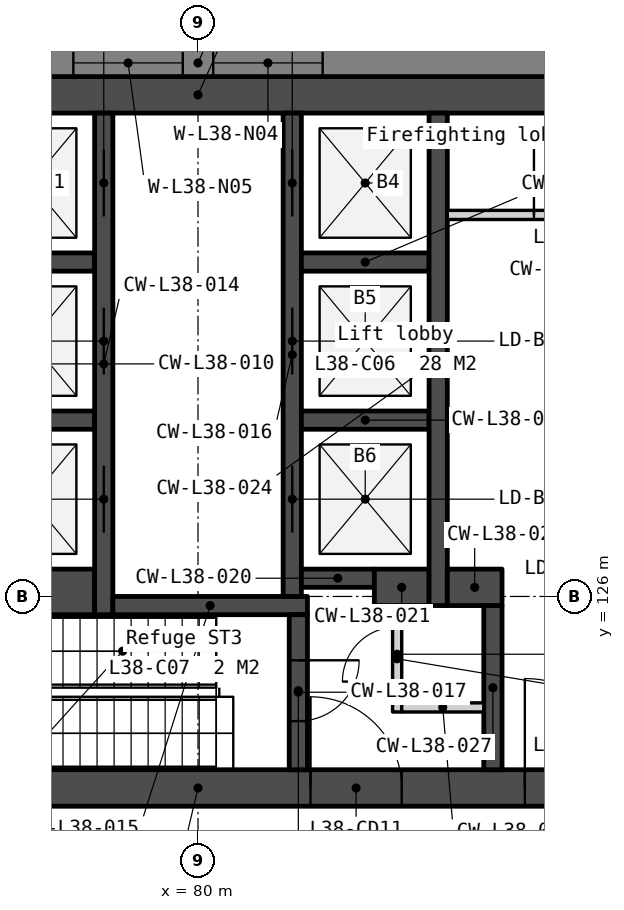
"""IFC4 building model, lengths in metres.
Left out: names, types, materials, properties, quantities, classifications, styles, units other than length and angle.
Written with IfcOpenShell. Run it as: python <this file> out.ifc"""

import sys

from ifc_helpers import new_model, si_unit, direction, frame, frame_2d, origin, place, context, subcontext, project, spatial, polyline, rectangle, outline, extrude, element, fill, save


model = new_model("IFC4")
c1 = context("Model", 3, precision=1e-05, world=origin(), true_north=direction((0.0, 1.0)))
c2 = subcontext(c1, "Body", "Model", "MODEL_VIEW")
j1 = project(units=[si_unit("LENGTHUNIT", "METRE"), si_unit("PLANEANGLEUNIT", "RADIAN")], contexts=[c1])
p1 = place(None, origin())
s1 = spatial("IfcSite", under=j1, at=p1, CompositionType="ELEMENT")
p2 = place(p1, origin())
s2 = spatial("IfcBuilding", under=s1, at=p2, CompositionType="ELEMENT")
p3 = place(p2, frame((0.0, 0.0, 152.0)))
s3 = spatial("IfcBuildingStorey", under=s2, at=p3, CompositionType="ELEMENT", Elevation=152.0)
p4 = place(p3, frame((69.0, 134.25, 0.0), z_axis=(0.0, 0.0, 1.0), x_axis=(1.0, 0.0, 0.0)))
e1 = element("IfcWall", 1, at=p4, inside=s3, PredefinedType="SOLIDWALL", context=c2, shape_type="SweptSolid", body=[
    extrude(rectangle(XDim=22.0, YDim=0.6, at=frame_2d((11.0, 0.0))), origin(), (0.0, 0.0, 1.0), 3.75),
])
p5 = place(p3, frame((69.0, 122.85, 0.0), z_axis=(0.0, 0.0, 1.0), x_axis=(1.0, 0.0, 0.0)))
e2 = element("IfcWall", 2, at=p5, inside=s3, PredefinedType="SOLIDWALL", context=c2, shape_type="SweptSolid", body=[
    extrude(rectangle(XDim=22.0, YDim=0.6, at=frame_2d((11.0, 0.0))), origin(), (0.0, 0.0, 1.0), 3.75),
])
p6 = place(p5, frame((16.375, 0.0, 0.0)))
e3 = element("IfcOpeningElement", 3, at=p6, cuts=e2, PredefinedType="OPENING", context=c2, shape_type="SweptSolid", body=[
    extrude(rectangle(XDim=1.8, YDim=2.1, at=frame_2d((0.9, 1.05))), frame((0.0, 0.31, 0.0), z_axis=(0.0, -1.0, 0.0), x_axis=(1.0, 0.0, 0.0)), (0.0, 0.0, 1.0), 0.62),
])
p7 = place(p5, frame((3.825, 0.0, 0.0)))
e4 = element("IfcOpeningElement", 4, at=p7, cuts=e2, PredefinedType="OPENING", context=c2, shape_type="SweptSolid", body=[
    extrude(rectangle(XDim=1.8, YDim=2.1, at=frame_2d((0.9, 1.05))), frame((0.0, 0.31, 0.0), z_axis=(0.0, -1.0, 0.0), x_axis=(1.0, 0.0, 0.0)), (0.0, 0.0, 1.0), 0.62),
])
p8 = place(p5, frame((12.85, 0.0, 0.0)))
e5 = element("IfcOpeningElement", 5, at=p8, cuts=e2, PredefinedType="OPENING", context=c2, shape_type="SweptSolid", body=[
    extrude(rectangle(XDim=1.5, YDim=2.1, at=frame_2d((0.75, 1.05))), frame((0.0, 0.31, 0.0), z_axis=(0.0, -1.0, 0.0), x_axis=(1.0, 0.0, 0.0)), (0.0, 0.0, 1.0), 0.62),
])
for number, where, z_axis, x_axis in (
    (6, (76.2, 131.5, 0.0), (0.0, 0.0, 1.0), (1.0, 0.0, 0.0)),
    (7, (76.2, 128.9, 0.0), (0.0, 0.0, 1.0), (1.0, 0.0, 0.0)),
):
    element("IfcWall", number, at=place(p3, frame(where, z_axis=z_axis, x_axis=x_axis)), inside=s3, PredefinedType="SOLIDWALL", context=c2, shape_type="SweptSolid", body=[
        extrude(rectangle(XDim=2.1, YDim=0.3, at=frame_2d((1.05, 0.0))), origin(), (0.0, 0.0, 1.0), 3.75),
    ])
p9 = place(p3, frame((76.2, 126.075, 0.0), z_axis=(0.0, 0.0, 1.0), x_axis=(1.0, 0.0, 0.0)))
e8 = element("IfcWall", 8, at=p9, inside=s3, PredefinedType="SOLIDWALL", context=c2, shape_type="SweptSolid", body=[
    extrude(rectangle(XDim=2.1, YDim=0.75, at=frame_2d((1.05, 0.0))), origin(), (0.0, 0.0, 1.0), 3.75),
])
p10 = place(p3, frame((78.45, 133.95, 0.0), z_axis=(0.0, 0.0, 1.0), x_axis=(0.0, -1.0, 0.0)))
e9 = element("IfcWall", 9, at=p10, inside=s3, PredefinedType="SOLIDWALL", context=c2, shape_type="SweptSolid", body=[
    extrude(rectangle(XDim=8.25, YDim=0.3, at=frame_2d((4.125, 0.0))), origin(), (0.0, 0.0, 1.0), 3.75),
])
p11 = place(p10, frame((0.6, 0.0, 0.0)))
e10 = element("IfcOpeningElement", 10, at=p11, cuts=e9, PredefinedType="OPENING", context=c2, shape_type="SweptSolid", body=[
    extrude(rectangle(XDim=1.1, YDim=2.1, at=frame_2d((0.55, 1.05))), frame((0.0, 0.16, 0.0), z_axis=(0.0, -1.0, 0.0), x_axis=(1.0, 0.0, 0.0)), (0.0, 0.0, 1.0), 0.32),
])
p12 = place(p10, frame((3.2, 0.0, 0.0)))
e11 = element("IfcOpeningElement", 11, at=p12, cuts=e9, PredefinedType="OPENING", context=c2, shape_type="SweptSolid", body=[
    extrude(rectangle(XDim=1.1, YDim=2.1, at=frame_2d((0.55, 1.05))), frame((0.0, 0.16, 0.0), z_axis=(0.0, -1.0, 0.0), x_axis=(1.0, 0.0, 0.0)), (0.0, 0.0, 1.0), 0.32),
])
p13 = place(p10, frame((5.8, 0.0, 0.0)))
e12 = element("IfcOpeningElement", 12, at=p13, cuts=e9, PredefinedType="OPENING", context=c2, shape_type="SweptSolid", body=[
    extrude(rectangle(XDim=1.1, YDim=2.1, at=frame_2d((0.55, 1.05))), frame((0.0, 0.16, 0.0), z_axis=(0.0, -1.0, 0.0), x_axis=(1.0, 0.0, 0.0)), (0.0, 0.0, 1.0), 0.32),
])
p14 = place(p3, frame((78.6, 125.85, 0.0), z_axis=(0.0, 0.0, 1.0), x_axis=(1.0, 0.0, 0.0)))
e13 = element("IfcWall", 13, at=p14, inside=s3, PredefinedType="SOLIDWALL", context=c2, shape_type="SweptSolid", body=[
    extrude(rectangle(XDim=3.2, YDim=0.3, at=frame_2d((1.6, 0.0))), origin(), (0.0, 0.0, 1.0), 3.75),
])
p15 = place(p3, frame((81.55, 133.95, 0.0), z_axis=(0.0, 0.0, 1.0), x_axis=(0.0, -1.0, 0.0)))
e14 = element("IfcWall", 14, at=p15, inside=s3, PredefinedType="SOLIDWALL", context=c2, shape_type="SweptSolid", body=[
    extrude(rectangle(XDim=7.95, YDim=0.3, at=frame_2d((3.975, 0.0))), origin(), (0.0, 0.0, 1.0), 3.75),
])
p16 = place(p15, frame((0.6, 0.0, 0.0)))
e15 = element("IfcOpeningElement", 15, at=p16, cuts=e14, PredefinedType="OPENING", context=c2, shape_type="SweptSolid", body=[
    extrude(rectangle(XDim=1.1, YDim=2.1, at=frame_2d((0.55, 1.05))), frame((0.0, 0.16, 0.0), z_axis=(0.0, -1.0, 0.0), x_axis=(1.0, 0.0, 0.0)), (0.0, 0.0, 1.0), 0.32),
])
p17 = place(p15, frame((3.2, 0.0, 0.0)))
e16 = element("IfcOpeningElement", 16, at=p17, cuts=e14, PredefinedType="OPENING", context=c2, shape_type="SweptSolid", body=[
    extrude(rectangle(XDim=1.1, YDim=2.1, at=frame_2d((0.55, 1.05))), frame((0.0, 0.16, 0.0), z_axis=(0.0, -1.0, 0.0), x_axis=(1.0, 0.0, 0.0)), (0.0, 0.0, 1.0), 0.32),
])
p18 = place(p15, frame((5.8, 0.0, 0.0)))
e17 = element("IfcOpeningElement", 17, at=p18, cuts=e14, PredefinedType="OPENING", context=c2, shape_type="SweptSolid", body=[
    extrude(rectangle(XDim=1.1, YDim=2.1, at=frame_2d((0.55, 1.05))), frame((0.0, 0.16, 0.0), z_axis=(0.0, -1.0, 0.0), x_axis=(1.0, 0.0, 0.0)), (0.0, 0.0, 1.0), 0.32),
])
p19 = place(p3, frame((81.65, 125.7, 0.0), z_axis=(0.0, 0.0, 1.0), x_axis=(0.0, -1.0, 0.0)))
e18 = element("IfcWall", 18, at=p19, inside=s3, PredefinedType="SOLIDWALL", context=c2, shape_type="SweptSolid", body=[
    extrude(rectangle(XDim=2.55, YDim=0.3, at=frame_2d((1.275, 0.0))), origin(), (0.0, 0.0, 1.0), 3.75),
])
p20 = place(p19, frame((0.75, 0.0, 0.0)))
e19 = element("IfcOpeningElement", 19, at=p20, cuts=e18, PredefinedType="OPENING", context=c2, shape_type="SweptSolid", body=[
    extrude(rectangle(XDim=1.0, YDim=2.1, at=frame_2d((0.5, 1.05))), frame((0.0, 0.16, 0.0), z_axis=(0.0, -1.0, 0.0), x_axis=(1.0, 0.0, 0.0)), (0.0, 0.0, 1.0), 0.32),
])
for number, where, z_axis, x_axis in (
    (20, (81.7, 131.5, 0.0), (0.0, 0.0, 1.0), (1.0, 0.0, 0.0)),
    (21, (81.7, 128.9, 0.0), (0.0, 0.0, 1.0), (1.0, 0.0, 0.0)),
):
    element("IfcWall", number, at=place(p3, frame(where, z_axis=z_axis, x_axis=x_axis)), inside=s3, PredefinedType="SOLIDWALL", context=c2, shape_type="SweptSolid", body=[
        extrude(rectangle(XDim=2.1, YDim=0.3, at=frame_2d((1.05, 0.0))), origin(), (0.0, 0.0, 1.0), 3.75),
    ])
p21 = place(p3, frame((81.7, 126.3, 0.0), z_axis=(0.0, 0.0, 1.0), x_axis=(1.0, 0.0, 0.0)))
e22 = element("IfcWall", 22, at=p21, inside=s3, PredefinedType="SOLIDWALL", context=c2, shape_type="SweptSolid", body=[
    extrude(rectangle(XDim=1.2, YDim=0.3, at=frame_2d((0.6, 0.0))), origin(), (0.0, 0.0, 1.0), 3.75),
])
p22 = place(p3, frame((82.9, 126.15, 0.0), z_axis=(0.0, 0.0, 1.0), x_axis=(1.0, 0.0, 0.0)))
e23 = element("IfcWall", 23, at=p22, inside=s3, PredefinedType="SOLIDWALL", context=c2, shape_type="SweptSolid", body=[
    extrude(rectangle(XDim=0.9, YDim=0.6, at=frame_2d((0.45, 0.0))), origin(), (0.0, 0.0, 1.0), 3.75),
])
p23 = place(p3, frame((83.275, 125.85, 0.0), z_axis=(0.0, 0.0, 1.0), x_axis=(0.0, -1.0, 0.0)))
e24 = element("IfcWall", 24, at=p23, inside=s3, PredefinedType="PARTITIONING", context=c2, shape_type="SweptSolid", body=[
    extrude(rectangle(XDim=1.75, YDim=0.15, at=frame_2d((0.875, 0.0))), origin(), (0.0, 0.0, 1.0), 3.75),
])
p24 = place(p23, frame((0.35, 0.0, 0.0)))
e25 = element("IfcOpeningElement", 25, at=p24, cuts=e24, PredefinedType="OPENING", context=c2, shape_type="SweptSolid", body=[
    extrude(rectangle(XDim=0.9, YDim=2.1, at=frame_2d((0.45, 1.05))), frame((0.0, 0.085, 0.0), z_axis=(0.0, -1.0, 0.0), x_axis=(1.0, 0.0, 0.0)), (0.0, 0.0, 1.0), 0.17),
])
p25 = place(p3, frame((83.35, 124.175, 0.0), z_axis=(0.0, 0.0, 1.0), x_axis=(1.0, 0.0, 0.0)))
e26 = element("IfcWall", 26, at=p25, inside=s3, PredefinedType="PARTITIONING", context=c2, shape_type="SweptSolid", body=[
    extrude(rectangle(XDim=1.35, YDim=0.15, at=frame_2d((0.675, 0.0))), origin(), (0.0, 0.0, 1.0), 3.75),
])
p26 = place(p3, frame((83.95, 133.95, 0.0), z_axis=(0.0, 0.0, 1.0), x_axis=(0.0, -1.0, 0.0)))
e27 = element("IfcWall", 27, at=p26, inside=s3, PredefinedType="SOLIDWALL", context=c2, shape_type="SweptSolid", body=[
    extrude(rectangle(XDim=8.1, YDim=0.3, at=frame_2d((4.05, 0.0))), origin(), (0.0, 0.0, 1.0), 3.75),
])
p27 = place(p3, frame((84.1, 132.275, 0.0), z_axis=(0.0, 0.0, 1.0), x_axis=(1.0, 0.0, 0.0)))
e28 = element("IfcWall", 28, at=p27, inside=s3, PredefinedType="PARTITIONING", context=c2, shape_type="SweptSolid", body=[
    extrude(rectangle(XDim=3.45, YDim=0.15, at=frame_2d((1.725, 0.0))), origin(), (0.0, 0.0, 1.0), 3.75),
])
p28 = place(p27, frame((1.425, 0.0, 0.0)))
e29 = element("IfcOpeningElement", 29, at=p28, cuts=e28, PredefinedType="OPENING", context=c2, shape_type="SweptSolid", body=[
    extrude(rectangle(XDim=1.5, YDim=2.1, at=frame_2d((0.75, 1.05))), frame((0.0, 0.085, 0.0), z_axis=(0.0, -1.0, 0.0), x_axis=(1.0, 0.0, 0.0)), (0.0, 0.0, 1.0), 0.17),
])
p29 = place(p3, frame((84.1, 126.15, 0.0), z_axis=(0.0, 0.0, 1.0), x_axis=(1.0, 0.0, 0.0)))
e30 = element("IfcWall", 30, at=p29, inside=s3, PredefinedType="SOLIDWALL", context=c2, shape_type="SweptSolid", body=[
    extrude(rectangle(XDim=0.9, YDim=0.6, at=frame_2d((0.45, 0.0))), origin(), (0.0, 0.0, 1.0), 3.75),
])
p30 = place(p3, frame((84.85, 125.85, 0.0), z_axis=(0.0, 0.0, 1.0), x_axis=(0.0, -1.0, 0.0)))
e31 = element("IfcWall", 31, at=p30, inside=s3, PredefinedType="SOLIDWALL", context=c2, shape_type="SweptSolid", body=[
    extrude(rectangle(XDim=2.7, YDim=0.3, at=frame_2d((1.35, 0.0))), origin(), (0.0, 0.0, 1.0), 3.75),
])
p31 = place(p3, frame((100.243, 134.775, -0.15), z_axis=(0.0, 0.0, 1.0), x_axis=(-1.0, 0.0, 0.0)))
e32 = element("IfcWall", 32, at=p31, inside=s3, PredefinedType="SOLIDWALL", context=c2, shape_type="SweptSolid", body=[
    extrude(outline(polyline([(40.486, 0.0), (40.486, 3.9), (0.0, 3.9), (0.0, 0.0), (40.486, 0.0)])), frame((0.0, 0.225, 0.0), z_axis=(0.0, -1.0, 0.0), x_axis=(1.0, 0.0, 0.0)), (0.0, 0.0, 1.0), 0.45),
])
p32 = place(p31, frame((0.87, 0.0, 0.95)))
e33 = element("IfcOpeningElement", 33, at=p32, cuts=e32, PredefinedType="OPENING", context=c2, shape_type="SweptSolid", body=[
    extrude(rectangle(XDim=1.2, YDim=2.2, at=frame_2d((0.6, 1.1))), frame((0.0, 0.235, 0.0), z_axis=(0.0, -1.0, 0.0), x_axis=(1.0, 0.0, 0.0)), (0.0, 0.0, 1.0), 0.47),
])
p33 = place(p31, frame((8.072, 0.0, 0.95)))
e34 = element("IfcOpeningElement", 34, at=p33, cuts=e32, PredefinedType="OPENING", context=c2, shape_type="SweptSolid", body=[
    extrude(rectangle(XDim=1.8, YDim=2.2, at=frame_2d((0.9, 1.1))), frame((0.0, 0.235, 0.0), z_axis=(0.0, -1.0, 0.0), x_axis=(1.0, 0.0, 0.0)), (0.0, 0.0, 1.0), 0.47),
])
p34 = place(p31, frame((10.372, 0.0, 0.95)))
e35 = element("IfcOpeningElement", 35, at=p34, cuts=e32, PredefinedType="OPENING", context=c2, shape_type="SweptSolid", body=[
    extrude(rectangle(XDim=1.8, YDim=2.2, at=frame_2d((0.9, 1.1))), frame((0.0, 0.235, 0.0), z_axis=(0.0, -1.0, 0.0), x_axis=(1.0, 0.0, 0.0)), (0.0, 0.0, 1.0), 0.47),
])
p35 = place(p31, frame((18.193, 0.0, 0.95)))
e36 = element("IfcOpeningElement", 36, at=p35, cuts=e32, PredefinedType="OPENING", context=c2, shape_type="SweptSolid", body=[
    extrude(rectangle(XDim=1.8, YDim=2.2, at=frame_2d((0.9, 1.1))), frame((0.0, 0.235, 0.0), z_axis=(0.0, -1.0, 0.0), x_axis=(1.0, 0.0, 0.0)), (0.0, 0.0, 1.0), 0.47),
])
p36 = place(p31, frame((20.493, 0.0, 0.95)))
e37 = element("IfcOpeningElement", 37, at=p36, cuts=e32, PredefinedType="OPENING", context=c2, shape_type="SweptSolid", body=[
    extrude(rectangle(XDim=1.8, YDim=2.2, at=frame_2d((0.9, 1.1))), frame((0.0, 0.235, 0.0), z_axis=(0.0, -1.0, 0.0), x_axis=(1.0, 0.0, 0.0)), (0.0, 0.0, 1.0), 0.47),
])
p37 = place(p31, frame((28.315, 0.0, 0.95)))
e38 = element("IfcOpeningElement", 38, at=p37, cuts=e32, PredefinedType="OPENING", context=c2, shape_type="SweptSolid", body=[
    extrude(rectangle(XDim=1.8, YDim=2.2, at=frame_2d((0.9, 1.1))), frame((0.0, 0.235, 0.0), z_axis=(0.0, -1.0, 0.0), x_axis=(1.0, 0.0, 0.0)), (0.0, 0.0, 1.0), 0.47),
])
p38 = place(p31, frame((30.615, 0.0, 0.95)))
e39 = element("IfcOpeningElement", 39, at=p38, cuts=e32, PredefinedType="OPENING", context=c2, shape_type="SweptSolid", body=[
    extrude(rectangle(XDim=1.8, YDim=2.2, at=frame_2d((0.9, 1.1))), frame((0.0, 0.235, 0.0), z_axis=(0.0, -1.0, 0.0), x_axis=(1.0, 0.0, 0.0)), (0.0, 0.0, 1.0), 0.47),
])
p39 = place(p31, frame((38.417, 0.0, 0.95)))
e40 = element("IfcOpeningElement", 40, at=p39, cuts=e32, PredefinedType="OPENING", context=c2, shape_type="SweptSolid", body=[
    extrude(rectangle(XDim=1.2, YDim=2.2, at=frame_2d((0.6, 1.1))), frame((0.0, 0.235, 0.0), z_axis=(0.0, -1.0, 0.0), x_axis=(1.0, 0.0, 0.0)), (0.0, 0.0, 1.0), 0.47),
])
p40 = place(p3, frame((82.105, 96.067, -0.15), z_axis=(0.0, 0.0, 1.0), x_axis=(0.499997369791, 0.866026922331, 0.0)))
e41 = element("IfcWall", 41, at=p40, inside=s3, PredefinedType="SOLIDWALL", context=c2, shape_type="SweptSolid", body=[
    extrude(outline(polyline([(40.486, 0.0), (40.486, 3.9), (0.0, 3.9), (0.0, 0.0), (40.486, 0.0)])), frame((0.0, 0.225, 0.0), z_axis=(0.0, -1.0, 0.0), x_axis=(1.0, 0.0, 0.0)), (0.0, 0.0, 1.0), 0.45),
])
p41 = place(p40, frame((0.87, 0.0, 0.95)))
e42 = element("IfcOpeningElement", 42, at=p41, cuts=e41, PredefinedType="OPENING", context=c2, shape_type="SweptSolid", body=[
    extrude(rectangle(XDim=1.2, YDim=2.2, at=frame_2d((0.6, 1.1))), frame((0.0, 0.235, 0.0), z_axis=(0.0, -1.0, 0.0), x_axis=(1.0, 0.0, 0.0)), (0.0, 0.0, 1.0), 0.47),
])
p42 = place(p40, frame((8.072, 0.0, 0.95)))
e43 = element("IfcOpeningElement", 43, at=p42, cuts=e41, PredefinedType="OPENING", context=c2, shape_type="SweptSolid", body=[
    extrude(rectangle(XDim=1.8, YDim=2.2, at=frame_2d((0.9, 1.1))), frame((0.0, 0.235, 0.0), z_axis=(0.0, -1.0, 0.0), x_axis=(1.0, 0.0, 0.0)), (0.0, 0.0, 1.0), 0.47),
])
p43 = place(p40, frame((10.372, 0.0, 0.95)))
e44 = element("IfcOpeningElement", 44, at=p43, cuts=e41, PredefinedType="OPENING", context=c2, shape_type="SweptSolid", body=[
    extrude(rectangle(XDim=1.8, YDim=2.2, at=frame_2d((0.9, 1.1))), frame((0.0, 0.235, 0.0), z_axis=(0.0, -1.0, 0.0), x_axis=(1.0, 0.0, 0.0)), (0.0, 0.0, 1.0), 0.47),
])
p44 = place(p40, frame((18.193, 0.0, 0.95)))
e45 = element("IfcOpeningElement", 45, at=p44, cuts=e41, PredefinedType="OPENING", context=c2, shape_type="SweptSolid", body=[
    extrude(rectangle(XDim=1.8, YDim=2.2, at=frame_2d((0.9, 1.1))), frame((0.0, 0.235, 0.0), z_axis=(0.0, -1.0, 0.0), x_axis=(1.0, 0.0, 0.0)), (0.0, 0.0, 1.0), 0.47),
])
p45 = place(p40, frame((20.493, 0.0, 0.95)))
e46 = element("IfcOpeningElement", 46, at=p45, cuts=e41, PredefinedType="OPENING", context=c2, shape_type="SweptSolid", body=[
    extrude(rectangle(XDim=1.8, YDim=2.2, at=frame_2d((0.9, 1.1))), frame((0.0, 0.235, 0.0), z_axis=(0.0, -1.0, 0.0), x_axis=(1.0, 0.0, 0.0)), (0.0, 0.0, 1.0), 0.47),
])
p46 = place(p40, frame((28.315, 0.0, 0.95)))
e47 = element("IfcOpeningElement", 47, at=p46, cuts=e41, PredefinedType="OPENING", context=c2, shape_type="SweptSolid", body=[
    extrude(rectangle(XDim=1.8, YDim=2.2, at=frame_2d((0.9, 1.1))), frame((0.0, 0.235, 0.0), z_axis=(0.0, -1.0, 0.0), x_axis=(1.0, 0.0, 0.0)), (0.0, 0.0, 1.0), 0.47),
])
p47 = place(p40, frame((30.615, 0.0, 0.95)))
e48 = element("IfcOpeningElement", 48, at=p47, cuts=e41, PredefinedType="OPENING", context=c2, shape_type="SweptSolid", body=[
    extrude(rectangle(XDim=1.8, YDim=2.2, at=frame_2d((0.9, 1.1))), frame((0.0, 0.235, 0.0), z_axis=(0.0, -1.0, 0.0), x_axis=(1.0, 0.0, 0.0)), (0.0, 0.0, 1.0), 0.47),
])
p48 = place(p40, frame((38.417, 0.0, 0.95)))
e49 = element("IfcOpeningElement", 49, at=p48, cuts=e41, PredefinedType="OPENING", context=c2, shape_type="SweptSolid", body=[
    extrude(rectangle(XDim=1.2, YDim=2.2, at=frame_2d((0.6, 1.1))), frame((0.0, 0.235, 0.0), z_axis=(0.0, -1.0, 0.0), x_axis=(1.0, 0.0, 0.0)), (0.0, 0.0, 1.0), 0.47),
])
p49 = place(p11, origin())
e50 = element("IfcDoor", 50, at=p49, inside=s3, OperationType="SLIDING_TO_RIGHT", PredefinedType="DOOR", context=c2, shape_type="SweptSolid", body=[
    extrude(rectangle(XDim=1.1, YDim=2.1, at=frame_2d((0.55, 1.05))), frame((0.0, 0.025, 0.0), z_axis=(0.0, -1.0, 0.0), x_axis=(1.0, 0.0, 0.0)), (0.0, 0.0, 1.0), 0.05),
])
fill(e10, e50)
p50 = place(p12, origin())
e51 = element("IfcDoor", 51, at=p50, inside=s3, OperationType="SLIDING_TO_RIGHT", PredefinedType="DOOR", context=c2, shape_type="SweptSolid", body=[
    extrude(rectangle(XDim=1.1, YDim=2.1, at=frame_2d((0.55, 1.05))), frame((0.0, 0.025, 0.0), z_axis=(0.0, -1.0, 0.0), x_axis=(1.0, 0.0, 0.0)), (0.0, 0.0, 1.0), 0.05),
])
fill(e11, e51)
p51 = place(p13, origin())
e52 = element("IfcDoor", 52, at=p51, inside=s3, OperationType="SLIDING_TO_RIGHT", PredefinedType="DOOR", context=c2, shape_type="SweptSolid", body=[
    extrude(rectangle(XDim=1.1, YDim=2.1, at=frame_2d((0.55, 1.05))), frame((0.0, 0.025, 0.0), z_axis=(0.0, -1.0, 0.0), x_axis=(1.0, 0.0, 0.0)), (0.0, 0.0, 1.0), 0.05),
])
fill(e12, e52)
p52 = place(p16, origin())
e53 = element("IfcDoor", 53, at=p52, inside=s3, OperationType="SLIDING_TO_LEFT", PredefinedType="DOOR", context=c2, shape_type="SweptSolid", body=[
    extrude(rectangle(XDim=1.1, YDim=2.1, at=frame_2d((0.55, 1.05))), frame((0.0, 0.025, 0.0), z_axis=(0.0, -1.0, 0.0), x_axis=(1.0, 0.0, 0.0)), (0.0, 0.0, 1.0), 0.05),
])
fill(e15, e53)
p53 = place(p17, origin())
e54 = element("IfcDoor", 54, at=p53, inside=s3, OperationType="SLIDING_TO_LEFT", PredefinedType="DOOR", context=c2, shape_type="SweptSolid", body=[
    extrude(rectangle(XDim=1.1, YDim=2.1, at=frame_2d((0.55, 1.05))), frame((0.0, 0.025, 0.0), z_axis=(0.0, -1.0, 0.0), x_axis=(1.0, 0.0, 0.0)), (0.0, 0.0, 1.0), 0.05),
])
fill(e16, e54)
p54 = place(p18, origin())
e55 = element("IfcDoor", 55, at=p54, inside=s3, OperationType="SLIDING_TO_LEFT", PredefinedType="DOOR", context=c2, shape_type="SweptSolid", body=[
    extrude(rectangle(XDim=1.1, YDim=2.1, at=frame_2d((0.55, 1.05))), frame((0.0, 0.025, 0.0), z_axis=(0.0, -1.0, 0.0), x_axis=(1.0, 0.0, 0.0)), (0.0, 0.0, 1.0), 0.05),
])
fill(e17, e55)
p55 = place(p6, origin())
e56 = element("IfcDoor", 56, at=p55, inside=s3, OperationType="DOUBLE_DOOR_DOUBLE_SWING", PredefinedType="DOOR", context=c2, shape_type="SweptSolid", body=[
    extrude(rectangle(XDim=1.8, YDim=2.1, at=frame_2d((0.9, 1.05))), frame((0.0, 0.025, 0.0), z_axis=(0.0, -1.0, 0.0), x_axis=(1.0, 0.0, 0.0)), (0.0, 0.0, 1.0), 0.05),
])
fill(e3, e56)
p56 = place(p8, origin())
e57 = element("IfcDoor", 57, at=p56, inside=s3, OperationType="DOUBLE_DOOR_DOUBLE_SWING", PredefinedType="DOOR", context=c2, shape_type="SweptSolid", body=[
    extrude(rectangle(XDim=1.5, YDim=2.1, at=frame_2d((0.75, 1.05))), frame((0.0, 0.025, 0.0), z_axis=(0.0, -1.0, 0.0), x_axis=(1.0, 0.0, 0.0)), (0.0, 0.0, 1.0), 0.05),
])
fill(e5, e57)
p57 = place(p24, origin())
e58 = element("IfcDoor", 58, at=p57, inside=s3, OperationType="SINGLE_SWING_RIGHT", PredefinedType="DOOR", context=c2, shape_type="SweptSolid", body=[
    extrude(rectangle(XDim=0.9, YDim=2.1, at=frame_2d((0.45, 1.05))), frame((0.0, 0.025, 0.0), z_axis=(0.0, -1.0, 0.0), x_axis=(1.0, 0.0, 0.0)), (0.0, 0.0, 1.0), 0.05),
])
fill(e25, e58)
p58 = place(p28, origin())
e59 = element("IfcDoor", 59, at=p58, inside=s3, OperationType="DOUBLE_DOOR_DOUBLE_SWING", PredefinedType="DOOR", context=c2, shape_type="SweptSolid", body=[
    extrude(rectangle(XDim=1.5, YDim=2.1, at=frame_2d((0.75, 1.05))), frame((0.0, 0.025, 0.0), z_axis=(0.0, -1.0, 0.0), x_axis=(1.0, 0.0, 0.0)), (0.0, 0.0, 1.0), 0.05),
])
fill(e29, e59)
p59 = place(p20, origin())
e60 = element("IfcDoor", 60, at=p59, inside=s3, OperationType="SINGLE_SWING_LEFT", PredefinedType="DOOR", context=c2, shape_type="SweptSolid", body=[
    extrude(rectangle(XDim=1.0, YDim=2.1, at=frame_2d((0.5, 1.05))), frame((0.0, 0.025, 0.0), z_axis=(0.0, -1.0, 0.0), x_axis=(1.0, 0.0, 0.0)), (0.0, 0.0, 1.0), 0.05),
])
fill(e19, e60)
p60 = place(p35, origin())
e61 = element("IfcWindow", 61, at=p60, inside=s3, PartitioningType="SINGLE_PANEL", PredefinedType="WINDOW", context=c2, shape_type="SweptSolid", body=[
    extrude(rectangle(XDim=1.8, YDim=2.2, at=frame_2d((0.9, 1.1))), frame((0.0, 0.03, 0.0), z_axis=(0.0, -1.0, 0.0), x_axis=(1.0, 0.0, 0.0)), (0.0, 0.0, 1.0), 0.06),
])
fill(e36, e61)
p61 = place(p36, origin())
e62 = element("IfcWindow", 62, at=p61, inside=s3, PartitioningType="SINGLE_PANEL", PredefinedType="WINDOW", context=c2, shape_type="SweptSolid", body=[
    extrude(rectangle(XDim=1.8, YDim=2.2, at=frame_2d((0.9, 1.1))), frame((0.0, 0.03, 0.0), z_axis=(0.0, -1.0, 0.0), x_axis=(1.0, 0.0, 0.0)), (0.0, 0.0, 1.0), 0.06),
])
fill(e37, e62)
save(model, sys.argv[1])
